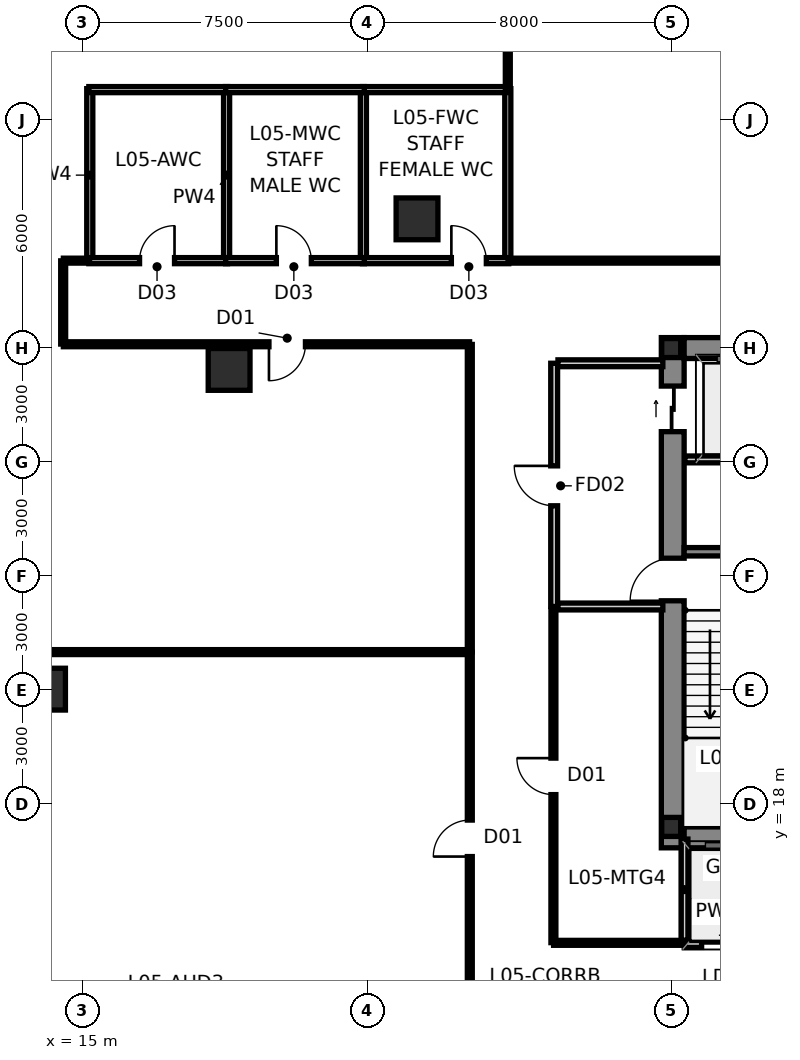
"""IFC4 building model, lengths in metres.
Left out: names, types, materials, properties, quantities, classifications, styles, units other than length and angle.
Written with IfcOpenShell. Run it as: python <this file> out.ifc"""

import sys

from ifc_helpers import new_model, si_unit, direction, frame, frame_2d, origin, origin_2d, place, context, subcontext, project, spatial, rectangle, hollow_rectangle, i_section, extrude, source, transform, mapped, element, fill, save


model = new_model("IFC4")
c1 = context("Model", 3, precision=1e-05, world=origin(), true_north=direction((0.0, 1.0)))
c2 = subcontext(c1, "Body", "Model", "MODEL_VIEW")
j1 = project(units=[si_unit("LENGTHUNIT", "METRE"), si_unit("PLANEANGLEUNIT", "RADIAN")], contexts=[c1])
p1 = place(None, origin())
s1 = spatial("IfcSite", under=j1, at=p1, CompositionType="ELEMENT")
p2 = place(p1, origin())
s2 = spatial("IfcBuilding", under=s1, at=p2, CompositionType="ELEMENT")
p3 = place(p2, frame((0.0, 0.0, 23.1)))
s3 = spatial("IfcBuildingStorey", under=s2, at=p3, CompositionType="ELEMENT", Elevation=23.1)
m1 = source(origin(), c2, "Body", "SweptSolid", [
    extrude(i_section(OverallWidth=0.5, OverallDepth=0.5, WebThickness=0.028, FlangeThickness=0.04, at=origin_2d()), origin(), (0.0, 0.0, 1.0), 4.5),
])
for number, where, z_axis, x_axis in (
    (1, (30.5, 17.4, 0.0), (0.0, 0.0, 1.0), (1.0, 0.0, 0.0)),
    (2, (30.5, 30.0, 0.0), (0.0, 0.0, 1.0), (1.0, 0.0, 0.0)),
):
    element("IfcColumn", number, at=place(p3, frame(where, z_axis=z_axis, x_axis=x_axis)), inside=s3, PredefinedType="COLUMN", context=c2, shape_type="MappedRepresentation", body=[
        mapped(m1, transform((0.0, 0.0, 0.0), scale=1.0)),
    ])
p4 = place(p3, frame((30.54, 16.85, 0.0), z_axis=(0.0, 0.0, 1.0), x_axis=(0.0, 1.0, 0.0)))
e3 = element("IfcWall", 3, at=p4, inside=s3, PredefinedType="SHEAR", context=c2, shape_type="SweptSolid", body=[
    extrude(rectangle(XDim=13.425, YDim=0.6, at=frame_2d((6.712, 0.0))), origin(), (0.0, 0.0, 1.0), 4.5),
])
p5 = place(p4, frame((6.5, 0.0, 0.0)))
e4 = element("IfcOpeningElement", 4, at=p5, cuts=e3, PredefinedType="OPENING", context=c2, shape_type="SweptSolid", body=[
    extrude(rectangle(XDim=1.12, YDim=2.15, at=frame_2d((0.56, 1.075))), frame((0.0, 0.312, 0.0), z_axis=(0.0, -1.0, 0.0), x_axis=(1.0, 0.0, 0.0)), (0.0, 0.0, 1.0), 0.624),
])
p6 = place(p4, frame((10.95, 0.0, 0.0)))
e5 = element("IfcOpeningElement", 5, at=p6, cuts=e3, PredefinedType="OPENING", context=c2, shape_type="SweptSolid", body=[
    extrude(rectangle(XDim=1.2, YDim=2.2, at=frame_2d((0.6, 1.1))), frame((0.0, 0.312, 0.0), z_axis=(0.0, -1.0, 0.0), x_axis=(1.0, 0.0, 0.0)), (0.0, 0.0, 1.0), 0.624),
])
for number, where, z_axis, x_axis in (
    (6, (30.84, 17.125, 0.0), (0.0, 0.0, 1.0), (1.0, 0.0, 0.0)),
    (7, (30.84, 30.0, 0.0), (0.0, 0.0, 1.0), (1.0, 0.0, 0.0)),
):
    element("IfcWall", number, at=place(p3, frame(where, z_axis=z_axis, x_axis=x_axis)), inside=s3, PredefinedType="SHEAR", context=c2, shape_type="SweptSolid", body=[
        extrude(rectangle(XDim=2.9, YDim=0.55, at=frame_2d((1.45, 0.0))), origin(), (0.0, 0.0, 1.0), 4.5),
    ])
p7 = place(p3, frame((30.84, 24.64, 0.0), z_axis=(0.0, 0.0, 1.0), x_axis=(1.0, 0.0, 0.0)))
e8 = element("IfcWall", 8, at=p7, inside=s3, PredefinedType="SHEAR", context=c2, shape_type="SweptSolid", body=[
    extrude(rectangle(XDim=2.9, YDim=0.22, at=frame_2d((1.45, 0.0))), origin(), (0.0, 0.0, 1.0), 4.5),
])
m2 = source(origin(), c2, "Body", "SweptSolid", [
    extrude(hollow_rectangle(XDim=1.1, YDim=1.1, WallThickness=0.06, at=origin_2d()), origin(), (0.0, 0.0, 1.0), 4.501),
])
p8 = place(p3, frame((18.866, 29.438, 0.0), z_axis=(0.01491662865, -0.013777540644, 0.999793815526), x_axis=(0.678501966239, 0.734598585494, 0.0)))
e9 = element("IfcColumn", 9, at=p8, inside=s3, PredefinedType="COLUMN", context=c2, shape_type="MappedRepresentation", body=[
    mapped(m2, transform((0.0, 0.0, 0.0), scale=1.0)),
])
m3 = source(origin(), c2, "Body", "SweptSolid", [
    extrude(hollow_rectangle(XDim=1.1, YDim=1.1, WallThickness=0.06, at=origin_2d()), origin(), (0.0, 0.0, 1.0), 4.501),
])
p9 = place(p3, frame((14.009, 21.025, 0.0), z_axis=(0.010413674417, -0.021586679261, 0.999712744074), x_axis=(0.900673807124, 0.434495906954, 0.0)))
e10 = element("IfcColumn", 10, at=p9, inside=s3, PredefinedType="COLUMN", context=c2, shape_type="MappedRepresentation", body=[
    mapped(m3, transform((0.0, 0.0, 0.0), scale=1.0)),
])
m4 = source(origin(), c2, "Body", "SweptSolid", [
    extrude(hollow_rectangle(XDim=1.1, YDim=1.1, WallThickness=0.06, at=origin_2d()), origin(), (0.0, 0.0, 1.0), 4.25),
])
p10 = place(p3, frame((23.811, 33.4, 0.0), z_axis=(0.0, 0.0, 1.0), x_axis=(1.0, 0.0, 0.0)))
e11 = element("IfcColumn", 11, at=p10, inside=s3, PredefinedType="COLUMN", context=c2, shape_type="MappedRepresentation", body=[
    mapped(m4, transform((0.0, 0.0, 0.0), scale=1.0)),
])
p11 = place(p3, frame((30.85, 14.32, 0.0), z_axis=(0.0, 0.0, 1.0), x_axis=(1.0, 0.0, 0.0)))
e12 = element("IfcWall", 12, at=p11, inside=s3, PredefinedType="PARTITIONING", context=c2, shape_type="SweptSolid", body=[
    extrude(rectangle(XDim=2.3, YDim=0.18, at=frame_2d((1.15, 0.0))), origin(), (0.0, 0.0, 1.0), 4.25),
])
p12 = place(p11, frame((0.45, 0.0, 0.0)))
e13 = element("IfcOpeningElement", 13, at=p12, cuts=e12, PredefinedType="OPENING", context=c2, shape_type="SweptSolid", body=[
    extrude(rectangle(XDim=1.35, YDim=2.25, at=frame_2d((0.675, 1.125))), frame((0.0, 0.102, 0.0), z_axis=(0.0, -1.0, 0.0), x_axis=(1.0, 0.0, 0.0)), (0.0, 0.0, 1.0), 0.204),
])
p13 = place(p3, frame((30.85, 14.42, 0.0), z_axis=(0.0, 0.0, 1.0), x_axis=(0.0, 1.0, 0.0)))
e14 = element("IfcWall", 14, at=p13, inside=s3, PredefinedType="PARTITIONING", context=c2, shape_type="SweptSolid", body=[
    extrude(rectangle(XDim=2.66, YDim=0.18, at=frame_2d((1.33, 0.0))), origin(), (0.0, 0.0, 1.0), 3.623),
])
p14 = place(p3, frame((27.42, 23.2, 0.0), z_axis=(0.0, 0.0, 1.0), x_axis=(0.0, 1.0, 0.0)))
e15 = element("IfcWall", 15, at=p14, inside=s3, PredefinedType="PARTITIONING", context=c2, shape_type="SweptSolid", body=[
    extrude(rectangle(XDim=6.4, YDim=0.18, at=frame_2d((3.2, 0.0))), origin(), (0.0, 0.0, 1.0), 3.876),
])
p15 = place(p14, frame((2.65, 0.0, 0.0)))
e16 = element("IfcOpeningElement", 16, at=p15, cuts=e15, PredefinedType="OPENING", context=c2, shape_type="SweptSolid", body=[
    extrude(rectangle(XDim=1.05, YDim=2.15, at=frame_2d((0.525, 1.075))), frame((0.0, 0.102, 0.0), z_axis=(0.0, -1.0, 0.0), x_axis=(1.0, 0.0, 0.0)), (0.0, 0.0, 1.0), 0.204),
])
p16 = place(p3, frame((27.52, 23.2, 0.0), z_axis=(0.0, 0.0, 1.0), x_axis=(1.0, 0.0, 0.0)))
e17 = element("IfcWall", 17, at=p16, inside=s3, PredefinedType="PARTITIONING", context=c2, shape_type="SweptSolid", body=[
    extrude(rectangle(XDim=2.76, YDim=0.18, at=frame_2d((1.38, 0.0))), origin(), (0.0, 0.0, 1.0), 4.25),
])
p17 = place(p3, frame((27.52, 29.6, 0.0), z_axis=(0.0, 0.0, 1.0), x_axis=(1.0, 0.0, 0.0)))
e18 = element("IfcWall", 18, at=p17, inside=s3, PredefinedType="PARTITIONING", context=c2, shape_type="SweptSolid", body=[
    extrude(rectangle(XDim=2.76, YDim=0.18, at=frame_2d((1.38, 0.0))), origin(), (0.0, 0.0, 1.0), 3.035),
])
p18 = place(p3, frame((30.86, 27.07, 0.0), z_axis=(0.0, 0.0, 1.0), x_axis=(1.0, 0.0, 0.0)))
e19 = element("IfcWall", 19, at=p18, inside=s3, PredefinedType="PARTITIONING", context=c2, shape_type="SweptSolid", body=[
    extrude(rectangle(XDim=2.9, YDim=0.18, at=frame_2d((1.45, 0.0))), origin(), (0.0, 0.0, 1.0), 4.25),
])
for number, where, z_axis, x_axis in (
    (20, (15.2, 32.275, 0.0), (0.0, 0.0, 1.0), (0.0, 1.0, 0.0)),
    (21, (18.8, 32.275, 0.0), (0.0, 0.0, 1.0), (0.0, 1.0, 0.0)),
    (22, (22.4, 32.275, 0.0), (0.0, 0.0, 1.0), (0.0, 1.0, 0.0)),
    (23, (26.2, 32.275, 0.0), (0.0, 0.0, 1.0), (0.0, 1.0, 0.0)),
):
    element("IfcWall", number, at=place(p3, frame(where, z_axis=z_axis, x_axis=x_axis)), inside=s3, PredefinedType="PLUMBINGWALL", context=c2, shape_type="SweptSolid", body=[
        extrude(rectangle(XDim=4.55, YDim=0.16, at=frame_2d((2.275, 0.0))), origin(), (0.0, 0.0, 1.0), 4.25),
    ])
p19 = place(p3, frame((22.375, 32.3, 0.0), z_axis=(0.0, 0.0, 1.0), x_axis=(1.0, 0.0, 0.0)))
e24 = element("IfcWall", 24, at=p19, inside=s3, PredefinedType="PLUMBINGWALL", context=c2, shape_type="SweptSolid", body=[
    extrude(rectangle(XDim=3.85, YDim=0.16, at=frame_2d((1.925, 0.0))), origin(), (0.0, 0.0, 1.0), 4.25),
])
p20 = place(p19, frame((2.34, 0.0, 0.0)))
e25 = element("IfcOpeningElement", 25, at=p20, cuts=e24, PredefinedType="OPENING", context=c2, shape_type="SweptSolid", body=[
    extrude(rectangle(XDim=0.92, YDim=2.1, at=frame_2d((0.46, 1.05))), frame((0.0, 0.092, 0.0), z_axis=(0.0, -1.0, 0.0), x_axis=(1.0, 0.0, 0.0)), (0.0, 0.0, 1.0), 0.184),
])
p21 = place(p3, frame((22.375, 36.8, 0.0), z_axis=(0.0, 0.0, 1.0), x_axis=(1.0, 0.0, 0.0)))
e26 = element("IfcWall", 26, at=p21, inside=s3, PredefinedType="PLUMBINGWALL", context=c2, shape_type="SweptSolid", body=[
    extrude(rectangle(XDim=3.85, YDim=0.16, at=frame_2d((1.925, 0.0))), origin(), (0.0, 0.0, 1.0), 4.25),
])
p22 = place(p3, frame((15.175, 32.3, 0.0), z_axis=(0.0, 0.0, 1.0), x_axis=(1.0, 0.0, 0.0)))
e27 = element("IfcWall", 27, at=p22, inside=s3, PredefinedType="PLUMBINGWALL", context=c2, shape_type="SweptSolid", body=[
    extrude(rectangle(XDim=3.65, YDim=0.16, at=frame_2d((1.825, 0.0))), origin(), (0.0, 0.0, 1.0), 4.25),
])
p23 = place(p22, frame((1.335, 0.0, 0.0)))
e28 = element("IfcOpeningElement", 28, at=p23, cuts=e27, PredefinedType="OPENING", context=c2, shape_type="SweptSolid", body=[
    extrude(rectangle(XDim=0.92, YDim=2.1, at=frame_2d((0.46, 1.05))), frame((0.0, 0.092, 0.0), z_axis=(0.0, -1.0, 0.0), x_axis=(1.0, 0.0, 0.0)), (0.0, 0.0, 1.0), 0.184),
])
p24 = place(p3, frame((15.175, 36.8, 0.0), z_axis=(0.0, 0.0, 1.0), x_axis=(1.0, 0.0, 0.0)))
e29 = element("IfcWall", 29, at=p24, inside=s3, PredefinedType="PLUMBINGWALL", context=c2, shape_type="SweptSolid", body=[
    extrude(rectangle(XDim=3.65, YDim=0.16, at=frame_2d((1.825, 0.0))), origin(), (0.0, 0.0, 1.0), 4.25),
])
p25 = place(p3, frame((18.775, 32.3, 0.0), z_axis=(0.0, 0.0, 1.0), x_axis=(1.0, 0.0, 0.0)))
e30 = element("IfcWall", 30, at=p25, inside=s3, PredefinedType="PLUMBINGWALL", context=c2, shape_type="SweptSolid", body=[
    extrude(rectangle(XDim=3.65, YDim=0.16, at=frame_2d((1.825, 0.0))), origin(), (0.0, 0.0, 1.0), 4.25),
])
p26 = place(p25, frame((1.335, 0.0, 0.0)))
e31 = element("IfcOpeningElement", 31, at=p26, cuts=e30, PredefinedType="OPENING", context=c2, shape_type="SweptSolid", body=[
    extrude(rectangle(XDim=0.92, YDim=2.1, at=frame_2d((0.46, 1.05))), frame((0.0, 0.092, 0.0), z_axis=(0.0, -1.0, 0.0), x_axis=(1.0, 0.0, 0.0)), (0.0, 0.0, 1.0), 0.184),
])
p27 = place(p3, frame((18.775, 36.8, 0.0), z_axis=(0.0, 0.0, 1.0), x_axis=(1.0, 0.0, 0.0)))
e32 = element("IfcWall", 32, at=p27, inside=s3, PredefinedType="PLUMBINGWALL", context=c2, shape_type="SweptSolid", body=[
    extrude(rectangle(XDim=3.65, YDim=0.16, at=frame_2d((1.825, 0.0))), origin(), (0.0, 0.0, 1.0), 4.25),
])
p28 = place(p3, frame((26.205, 32.3, 0.0), z_axis=(0.0, 0.0, 1.0), x_axis=(1.0, 0.0, 0.0)))
e33 = element("IfcWall", 33, at=p28, inside=s3, PredefinedType="PARTITIONING", context=c2, shape_type="SweptSolid", body=[
    extrude(rectangle(XDim=17.79, YDim=0.13, at=frame_2d((8.895, 0.0))), origin(), (0.0, 0.0, 1.0), 4.25),
])
p29 = place(p28, frame((8.415, 0.0, 0.0)))
e34 = element("IfcOpeningElement", 34, at=p29, cuts=e33, PredefinedType="OPENING", context=c2, shape_type="SweptSolid", body=[
    extrude(rectangle(XDim=0.96, YDim=2.15, at=frame_2d((0.48, 1.075))), frame((0.0, 0.077, 0.0), z_axis=(0.0, -1.0, 0.0), x_axis=(1.0, 0.0, 0.0)), (0.0, 0.0, 1.0), 0.154),
])
p30 = place(p3, frame((9.73, 22.0, 0.0), z_axis=(0.0, 0.0, 1.0), x_axis=(1.0, 0.0, 0.0)))
e35 = element("IfcWall", 35, at=p30, inside=s3, PredefinedType="PARTITIONING", context=c2, shape_type="SweptSolid", body=[
    extrude(rectangle(XDim=15.465, YDim=0.13, at=frame_2d((7.732, 0.0))), origin(), (0.0, 0.0, 1.0), 4.25),
])
p31 = place(p3, frame((26.2, 36.805, 0.0), z_axis=(0.0, 0.0, 1.0), x_axis=(0.0, 1.0, 0.0)))
e36 = element("IfcWall", 36, at=p31, inside=s3, PredefinedType="PARTITIONING", context=c2, shape_type="SweptSolid", body=[
    extrude(rectangle(XDim=13.865, YDim=0.13, at=frame_2d((6.933, 0.0))), origin(), (0.0, 0.0, 1.0), 4.25),
])
p32 = place(p3, frame((25.195, 30.1, 0.0), z_axis=(0.0, 0.0, 1.0), x_axis=(-1.0, 0.0, 0.0)))
e37 = element("IfcWall", 37, at=p32, inside=s3, PredefinedType="PARTITIONING", context=c2, shape_type="SweptSolid", body=[
    extrude(rectangle(XDim=10.69, YDim=0.13, at=frame_2d((5.345, 0.0))), origin(), (0.0, 0.0, 1.0), 3.035),
])
p33 = place(p32, frame((4.32, 0.0, 0.0)))
e38 = element("IfcOpeningElement", 38, at=p33, cuts=e37, PredefinedType="OPENING", context=c2, shape_type="SweptSolid", body=[
    extrude(rectangle(XDim=0.96, YDim=2.15, at=frame_2d((0.48, 1.075))), frame((0.0, 0.077, 0.0), z_axis=(0.0, -1.0, 0.0), x_axis=(1.0, 0.0, 0.0)), (0.0, 0.0, 1.0), 0.154),
])
p34 = place(p3, frame((25.2, 12.205, 0.0), z_axis=(0.0, 0.0, 1.0), x_axis=(0.0, 1.0, 0.0)))
e39 = element("IfcWall", 39, at=p34, inside=s3, PredefinedType="PARTITIONING", context=c2, shape_type="SweptSolid", body=[
    extrude(rectangle(XDim=9.79, YDim=0.13, at=frame_2d((4.895, 0.0))), origin(), (0.0, 0.0, 1.0), 4.25),
])
p35 = place(p34, frame((4.415, 0.0, 0.0)))
e40 = element("IfcOpeningElement", 40, at=p35, cuts=e39, PredefinedType="OPENING", context=c2, shape_type="SweptSolid", body=[
    extrude(rectangle(XDim=0.96, YDim=2.15, at=frame_2d((0.48, 1.075))), frame((0.0, 0.077, 0.0), z_axis=(0.0, -1.0, 0.0), x_axis=(1.0, 0.0, 0.0)), (0.0, 0.0, 1.0), 0.154),
])
p36 = place(p3, frame((27.4, 14.355, 0.0), z_axis=(0.0, 0.0, 1.0), x_axis=(0.0, 1.0, 0.0)))
e41 = element("IfcWall", 41, at=p36, inside=s3, PredefinedType="PARTITIONING", context=c2, shape_type="SweptSolid", body=[
    extrude(rectangle(XDim=8.75, YDim=0.13, at=frame_2d((4.375, 0.0))), origin(), (0.0, 0.0, 1.0), 3.876),
])
p37 = place(p36, frame((3.895, 0.0, 0.0)))
e42 = element("IfcOpeningElement", 42, at=p37, cuts=e41, PredefinedType="OPENING", context=c2, shape_type="SweptSolid", body=[
    extrude(rectangle(XDim=0.96, YDim=2.15, at=frame_2d((0.48, 1.075))), frame((0.0, 0.077, 0.0), z_axis=(0.0, -1.0, 0.0), x_axis=(1.0, 0.0, 0.0)), (0.0, 0.0, 1.0), 0.154),
])
p38 = place(p3, frame((25.2, 22.005, 0.0), z_axis=(0.0, 0.0, 1.0), x_axis=(0.0, 1.0, 0.0)))
e43 = element("IfcWall", 43, at=p38, inside=s3, PredefinedType="PARTITIONING", context=c2, shape_type="SweptSolid", body=[
    extrude(rectangle(XDim=8.09, YDim=0.13, at=frame_2d((4.045, 0.0))), origin(), (0.0, 0.0, 1.0), 3.876),
])
p39 = place(p3, frame((30.725, 14.35, 0.0), z_axis=(0.0, 0.0, 1.0), x_axis=(-1.0, 0.0, 0.0)))
e44 = element("IfcWall", 44, at=p39, inside=s3, PredefinedType="PARTITIONING", context=c2, shape_type="SweptSolid", body=[
    extrude(rectangle(XDim=3.32, YDim=0.13, at=frame_2d((1.66, 0.0))), origin(), (0.0, 0.0, 1.0), 4.25),
])
p40 = place(p3, frame((14.5, 30.105, 0.0), z_axis=(0.0, 0.0, 1.0), x_axis=(0.0, 1.0, 0.0)))
e45 = element("IfcWall", 45, at=p40, inside=s3, PredefinedType="PARTITIONING", context=c2, shape_type="SweptSolid", body=[
    extrude(rectangle(XDim=2.19, YDim=0.13, at=frame_2d((1.095, 0.0))), origin(), (0.0, 0.0, 1.0), 4.25),
])
p41 = place(p3, frame((14.505, 32.3, 0.0), z_axis=(0.0, 0.0, 1.0), x_axis=(1.0, 0.0, 0.0)))
e46 = element("IfcWall", 46, at=p41, inside=s3, PredefinedType="PARTITIONING", context=c2, shape_type="SweptSolid", body=[
    extrude(rectangle(XDim=0.69, YDim=0.13, at=frame_2d((0.345, 0.0))), origin(), (0.0, 0.0, 1.0), 4.25),
])
p42 = place(p5, origin())
e47 = element("IfcDoor", 47, at=p42, inside=s3, OperationType="SINGLE_SWING_LEFT", PredefinedType="DOOR", context=c2, shape_type="SweptSolid", body=[
    extrude(rectangle(XDim=1.12, YDim=2.15, at=frame_2d((0.56, 1.075))), frame((0.0, 0.025, 0.0), z_axis=(0.0, -1.0, 0.0), x_axis=(1.0, 0.0, 0.0)), (0.0, 0.0, 1.0), 0.05),
])
fill(e4, e47)
p43 = place(p6, origin())
e48 = element("IfcDoor", 48, at=p43, inside=s3, OperationType="SLIDING_TO_LEFT", PredefinedType="DOOR", context=c2, shape_type="SweptSolid", body=[
    extrude(rectangle(XDim=1.2, YDim=2.2, at=frame_2d((0.6, 1.1))), frame((0.0, 0.025, 0.0), z_axis=(0.0, -1.0, 0.0), x_axis=(1.0, 0.0, 0.0)), (0.0, 0.0, 1.0), 0.05),
])
fill(e5, e48)
p44 = place(p12, origin())
e49 = element("IfcDoor", 49, at=p44, inside=s3, OperationType="SLIDING_TO_LEFT", PredefinedType="DOOR", context=c2, shape_type="SweptSolid", body=[
    extrude(rectangle(XDim=1.35, YDim=2.25, at=frame_2d((0.675, 1.125))), frame((0.0, 0.025, 0.0), z_axis=(0.0, -1.0, 0.0), x_axis=(1.0, 0.0, 0.0)), (0.0, 0.0, 1.0), 0.05),
])
fill(e13, e49)
p45 = place(p15, origin())
e50 = element("IfcDoor", 50, at=p45, inside=s3, OperationType="SINGLE_SWING_RIGHT", PredefinedType="DOOR", context=c2, shape_type="SweptSolid", body=[
    extrude(rectangle(XDim=1.05, YDim=2.15, at=frame_2d((0.525, 1.075))), frame((0.0, 0.025, 0.0), z_axis=(0.0, -1.0, 0.0), x_axis=(1.0, 0.0, 0.0)), (0.0, 0.0, 1.0), 0.05),
])
fill(e16, e50)
p46 = place(p20, origin())
e51 = element("IfcDoor", 51, at=p46, inside=s3, OperationType="SINGLE_SWING_LEFT", PredefinedType="DOOR", context=c2, shape_type="SweptSolid", body=[
    extrude(rectangle(XDim=0.92, YDim=2.1, at=frame_2d((0.46, 1.05))), frame((0.0, 0.025, 0.0), z_axis=(0.0, -1.0, 0.0), x_axis=(1.0, 0.0, 0.0)), (0.0, 0.0, 1.0), 0.05),
])
fill(e25, e51)
p47 = place(p23, origin())
e52 = element("IfcDoor", 52, at=p47, inside=s3, OperationType="SINGLE_SWING_RIGHT", PredefinedType="DOOR", context=c2, shape_type="SweptSolid", body=[
    extrude(rectangle(XDim=0.92, YDim=2.1, at=frame_2d((0.46, 1.05))), frame((0.0, 0.025, 0.0), z_axis=(0.0, -1.0, 0.0), x_axis=(1.0, 0.0, 0.0)), (0.0, 0.0, 1.0), 0.05),
])
fill(e28, e52)
p48 = place(p26, origin())
e53 = element("IfcDoor", 53, at=p48, inside=s3, OperationType="SINGLE_SWING_LEFT", PredefinedType="DOOR", context=c2, shape_type="SweptSolid", body=[
    extrude(rectangle(XDim=0.92, YDim=2.1, at=frame_2d((0.46, 1.05))), frame((0.0, 0.025, 0.0), z_axis=(0.0, -1.0, 0.0), x_axis=(1.0, 0.0, 0.0)), (0.0, 0.0, 1.0), 0.05),
])
fill(e31, e53)
p49 = place(p33, origin())
e54 = element("IfcDoor", 54, at=p49, inside=s3, OperationType="SINGLE_SWING_RIGHT", PredefinedType="DOOR", context=c2, shape_type="SweptSolid", body=[
    extrude(rectangle(XDim=0.96, YDim=2.15, at=frame_2d((0.48, 1.075))), frame((0.0, 0.025, 0.0), z_axis=(0.0, -1.0, 0.0), x_axis=(1.0, 0.0, 0.0)), (0.0, 0.0, 1.0), 0.05),
])
fill(e38, e54)
p50 = place(p35, origin())
e55 = element("IfcDoor", 55, at=p50, inside=s3, OperationType="SINGLE_SWING_LEFT", PredefinedType="DOOR", context=c2, shape_type="SweptSolid", body=[
    extrude(rectangle(XDim=0.96, YDim=2.15, at=frame_2d((0.48, 1.075))), frame((0.0, 0.025, 0.0), z_axis=(0.0, -1.0, 0.0), x_axis=(1.0, 0.0, 0.0)), (0.0, 0.0, 1.0), 0.05),
])
fill(e40, e55)
p51 = place(p37, origin())
e56 = element("IfcDoor", 56, at=p51, inside=s3, OperationType="SINGLE_SWING_RIGHT", PredefinedType="DOOR", context=c2, shape_type="SweptSolid", body=[
    extrude(rectangle(XDim=0.96, YDim=2.15, at=frame_2d((0.48, 1.075))), frame((0.0, 0.025, 0.0), z_axis=(0.0, -1.0, 0.0), x_axis=(1.0, 0.0, 0.0)), (0.0, 0.0, 1.0), 0.05),
])
fill(e42, e56)
save(model, sys.argv[1])
